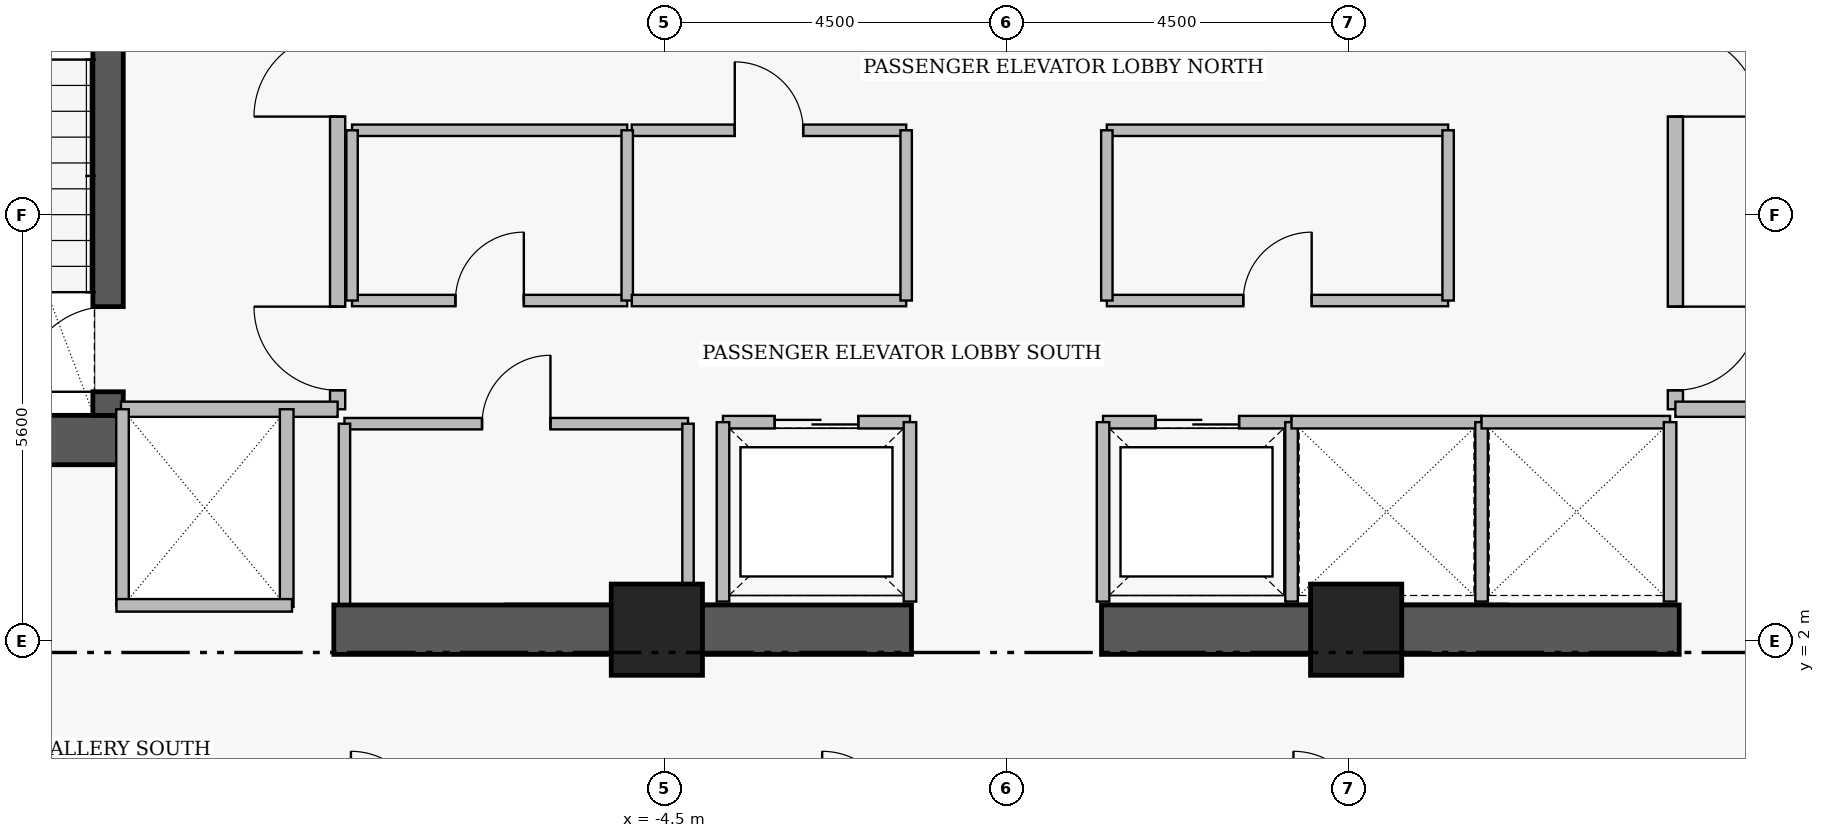
"""IFC4 building model, lengths in metres.
Left out: names, types, materials, properties, quantities, classifications, styles, units other than length and angle.
Written with IfcOpenShell. Run it as: python <this file> out.ifc"""

import sys

from ifc_helpers import new_model, si_unit, direction, frame, frame_2d, origin, origin_2d, place, context, subcontext, project, spatial, rectangle, extrude, element, fill, save


model = new_model("IFC4")
c1 = context("Model", 3, precision=1e-05, world=origin(), true_north=direction((0.0, 1.0)))
c2 = subcontext(c1, "Body", "Model", "MODEL_VIEW")
j1 = project(units=[si_unit("LENGTHUNIT", "METRE"), si_unit("PLANEANGLEUNIT", "RADIAN")], contexts=[c1])
p1 = place(None, origin())
s1 = spatial("IfcSite", under=j1, at=p1, CompositionType="ELEMENT")
p2 = place(p1, origin())
s2 = spatial("IfcBuilding", under=s1, at=p2, CompositionType="ELEMENT")
p3 = place(p2, frame((0.0, 0.0, 188.65)))
s3 = spatial("IfcBuildingStorey", under=s2, at=p3, CompositionType="ELEMENT", Elevation=188.65)
p4 = place(p3, frame((-16.06, 4.645, 0.0), z_axis=(0.0, 0.0, 1.0), x_axis=(1.0, 0.0, 0.0)))
e1 = element("IfcWall", 1, at=p4, inside=s3, PredefinedType="SHEAR", context=c2, shape_type="SweptSolid", body=[
    extrude(rectangle(XDim=4.46, YDim=0.65, at=frame_2d((2.23, 0.0))), origin(), (0.0, 0.0, 1.0), 3.56),
])
for number, where, z_axis, x_axis in (
    (2, (-8.85, 2.15, 0.0), (0.0, 0.0, 1.0), (1.0, 0.0, 0.0)),
    (3, (1.25, 2.15, 0.0), (0.0, 0.0, 1.0), (1.0, 0.0, 0.0)),
):
    element("IfcWall", number, at=place(p3, frame(where, z_axis=z_axis, x_axis=x_axis)), inside=s3, PredefinedType="SHEAR", context=c2, shape_type="SweptSolid", body=[
        extrude(rectangle(XDim=7.6, YDim=0.65, at=frame_2d((3.8, 0.0))), origin(), (0.0, 0.0, 1.0), 3.53),
    ])
p5 = place(p3, frame((-11.82, 4.97, 0.0), z_axis=(0.0, 0.0, 1.0), x_axis=(0.0, 1.0, 0.0)))
e4 = element("IfcWall", 4, at=p5, inside=s3, PredefinedType="SHEAR", context=c2, shape_type="SweptSolid", body=[
    extrude(rectangle(XDim=8.96, YDim=0.4, at=frame_2d((4.48, 0.0))), origin(), (0.0, 0.0, 1.0), 3.56),
])
p6 = place(p5, frame((0.31, 0.0, 0.0)))
e5 = element("IfcOpeningElement", 5, at=p6, cuts=e4, PredefinedType="OPENING", context=c2, shape_type="SweptSolid", body=[
    extrude(rectangle(XDim=1.12, YDim=2.22, at=frame_2d((0.56, 1.11))), frame((0.0, 0.21, 0.0), z_axis=(0.0, -1.0, 0.0), x_axis=(1.0, 0.0, 0.0)), (0.0, 0.0, 1.0), 0.42),
])
for number, where, z_axis, x_axis in (
    (6, (-4.6, 2.15, 0.0), (0.0, 0.0, 1.0), (1.0, 0.0, 0.0)),
    (7, (4.6, 2.15, 0.0), (0.0, 0.0, 1.0), (1.0, 0.0, 0.0)),
):
    element("IfcColumn", number, at=place(p3, frame(where, z_axis=z_axis, x_axis=x_axis)), inside=s3, PredefinedType="COLUMN", context=c2, shape_type="SweptSolid", body=[
        extrude(rectangle(XDim=1.2, YDim=1.2, at=origin_2d()), origin(), (0.0, 0.0, 1.0), 3.75),
    ])
p7 = place(p3, frame((-8.8, 5.05, 0.0), z_axis=(0.0, 0.0, 1.0), x_axis=(0.0, 1.0, 0.0)))
e8 = element("IfcWall", 8, at=p7, inside=s3, PredefinedType="PARTITIONING", context=c2, shape_type="SweptSolid", body=[
    extrude(rectangle(XDim=6.1, YDim=0.2, at=frame_2d((3.05, 0.0))), origin(), (0.0, 0.0, 1.0), 3.53),
])
p8 = place(p7, frame((0.25, 0.0, 0.0)))
e9 = element("IfcOpeningElement", 9, at=p8, cuts=e8, PredefinedType="OPENING", context=c2, shape_type="SweptSolid", body=[
    extrude(rectangle(XDim=1.1, YDim=2.2, at=frame_2d((0.55, 1.1))), frame((0.0, 0.11, 0.0), z_axis=(0.0, -1.0, 0.0), x_axis=(1.0, 0.0, 0.0)), (0.0, 0.0, 1.0), 0.22),
])
p9 = place(p7, frame((3.85, 0.0, 0.0)))
e10 = element("IfcOpeningElement", 10, at=p9, cuts=e8, PredefinedType="OPENING", context=c2, shape_type="SweptSolid", body=[
    extrude(rectangle(XDim=1.1, YDim=2.2, at=frame_2d((0.55, 1.1))), frame((0.0, 0.11, 0.0), z_axis=(0.0, -1.0, 0.0), x_axis=(1.0, 0.0, 0.0)), (0.0, 0.0, 1.0), 0.22),
])
p10 = place(p3, frame((8.8, 11.15, 0.0), z_axis=(0.0, 0.0, 1.0), x_axis=(0.0, -1.0, 0.0)))
e11 = element("IfcWall", 11, at=p10, inside=s3, PredefinedType="PARTITIONING", context=c2, shape_type="SweptSolid", body=[
    extrude(rectangle(XDim=6.1, YDim=0.2, at=frame_2d((3.05, 0.0))), origin(), (0.0, 0.0, 1.0), 3.53),
])
p11 = place(p10, frame((1.15, 0.0, 0.0)))
e12 = element("IfcOpeningElement", 12, at=p11, cuts=e11, PredefinedType="OPENING", context=c2, shape_type="SweptSolid", body=[
    extrude(rectangle(XDim=1.1, YDim=2.2, at=frame_2d((0.55, 1.1))), frame((0.0, 0.11, 0.0), z_axis=(0.0, -1.0, 0.0), x_axis=(1.0, 0.0, 0.0)), (0.0, 0.0, 1.0), 0.22),
])
p12 = place(p10, frame((4.75, 0.0, 0.0)))
e13 = element("IfcOpeningElement", 13, at=p12, cuts=e11, PredefinedType="OPENING", context=c2, shape_type="SweptSolid", body=[
    extrude(rectangle(XDim=1.1, YDim=2.2, at=frame_2d((0.55, 1.1))), frame((0.0, 0.11, 0.0), z_axis=(0.0, -1.0, 0.0), x_axis=(1.0, 0.0, 0.0)), (0.0, 0.0, 1.0), 0.22),
])
p13 = place(p3, frame((-3.73, 4.88, 0.0), z_axis=(0.0, 0.0, 1.0), x_axis=(1.0, 0.0, 0.0)))
e14 = element("IfcWall", 14, at=p13, inside=s3, PredefinedType="PARTITIONING", context=c2, shape_type="SweptSolid", body=[
    extrude(rectangle(XDim=2.46, YDim=0.165, at=frame_2d((1.23, 0.0))), origin(), (0.0, 0.0, 1.0), 3.53),
])
p14 = place(p13, frame((0.68, 0.0, 0.0)))
e15 = element("IfcOpeningElement", 15, at=p14, cuts=e14, PredefinedType="OPENING", context=c2, shape_type="SweptSolid", body=[
    extrude(rectangle(XDim=1.1, YDim=2.25, at=frame_2d((0.55, 1.125))), frame((0.0, 0.093, 0.0), z_axis=(0.0, -1.0, 0.0), x_axis=(1.0, 0.0, 0.0)), (0.0, 0.0, 1.0), 0.185),
])
p15 = place(p3, frame((1.27, 4.88, 0.0), z_axis=(0.0, 0.0, 1.0), x_axis=(1.0, 0.0, 0.0)))
e16 = element("IfcWall", 16, at=p15, inside=s3, PredefinedType="PARTITIONING", context=c2, shape_type="SweptSolid", body=[
    extrude(rectangle(XDim=2.48, YDim=0.165, at=frame_2d((1.24, 0.0))), origin(), (0.0, 0.0, 1.0), 3.53),
])
p16 = place(p15, frame((0.69, 0.0, 0.0)))
e17 = element("IfcOpeningElement", 17, at=p16, cuts=e16, PredefinedType="OPENING", context=c2, shape_type="SweptSolid", body=[
    extrude(rectangle(XDim=1.1, YDim=2.25, at=frame_2d((0.55, 1.125))), frame((0.0, 0.093, 0.0), z_axis=(0.0, -1.0, 0.0), x_axis=(1.0, 0.0, 0.0)), (0.0, 0.0, 1.0), 0.185),
])
p17 = place(p3, frame((-8.71, 4.86, 0.0), z_axis=(0.0, 0.0, 1.0), x_axis=(1.0, 0.0, 0.0)))
e18 = element("IfcWall", 18, at=p17, inside=s3, PredefinedType="PARTITIONING", context=c2, shape_type="SweptSolid", body=[
    extrude(rectangle(XDim=4.52, YDim=0.15, at=frame_2d((2.26, 0.0))), origin(), (0.0, 0.0, 1.0), 3.53),
])
p18 = place(p17, frame((1.81, 0.0, 0.0)))
e19 = element("IfcOpeningElement", 19, at=p18, cuts=e18, PredefinedType="OPENING", context=c2, shape_type="SweptSolid", body=[
    extrude(rectangle(XDim=0.9, YDim=2.15, at=frame_2d((0.45, 1.075))), frame((0.0, 0.085, 0.0), z_axis=(0.0, -1.0, 0.0), x_axis=(1.0, 0.0, 0.0)), (0.0, 0.0, 1.0), 0.17),
])
p19 = place(p3, frame((-8.61, 6.48, 0.0), z_axis=(0.0, 0.0, 1.0), x_axis=(1.0, 0.0, 0.0)))
e20 = element("IfcWall", 20, at=p19, inside=s3, PredefinedType="PARTITIONING", context=c2, shape_type="SweptSolid", body=[
    extrude(rectangle(XDim=3.62, YDim=0.15, at=frame_2d((1.81, 0.0))), origin(), (0.0, 0.0, 1.0), 3.53),
])
p20 = place(p19, frame((1.36, 0.0, 0.0)))
e21 = element("IfcOpeningElement", 21, at=p20, cuts=e20, PredefinedType="OPENING", context=c2, shape_type="SweptSolid", body=[
    extrude(rectangle(XDim=0.9, YDim=2.15, at=frame_2d((0.45, 1.075))), frame((0.0, 0.085, 0.0), z_axis=(0.0, -1.0, 0.0), x_axis=(1.0, 0.0, 0.0)), (0.0, 0.0, 1.0), 0.17),
])
p21 = place(p3, frame((-4.93, 8.72, 0.0), z_axis=(0.0, 0.0, 1.0), x_axis=(1.0, 0.0, 0.0)))
e22 = element("IfcWall", 22, at=p21, inside=s3, PredefinedType="PARTITIONING", context=c2, shape_type="SweptSolid", body=[
    extrude(rectangle(XDim=3.61, YDim=0.15, at=frame_2d((1.805, 0.0))), origin(), (0.0, 0.0, 1.0), 3.53),
])
p22 = place(p21, frame((1.355, 0.0, 0.0)))
e23 = element("IfcOpeningElement", 23, at=p22, cuts=e22, PredefinedType="OPENING", context=c2, shape_type="SweptSolid", body=[
    extrude(rectangle(XDim=0.9, YDim=2.15, at=frame_2d((0.45, 1.075))), frame((0.0, 0.085, 0.0), z_axis=(0.0, -1.0, 0.0), x_axis=(1.0, 0.0, 0.0)), (0.0, 0.0, 1.0), 0.17),
])
p23 = place(p3, frame((1.32, 6.48, 0.0), z_axis=(0.0, 0.0, 1.0), x_axis=(1.0, 0.0, 0.0)))
e24 = element("IfcWall", 24, at=p23, inside=s3, PredefinedType="PARTITIONING", context=c2, shape_type="SweptSolid", body=[
    extrude(rectangle(XDim=4.49, YDim=0.15, at=frame_2d((2.245, 0.0))), origin(), (0.0, 0.0, 1.0), 3.53),
])
p24 = place(p23, frame((1.795, 0.0, 0.0)))
e25 = element("IfcOpeningElement", 25, at=p24, cuts=e24, PredefinedType="OPENING", context=c2, shape_type="SweptSolid", body=[
    extrude(rectangle(XDim=0.9, YDim=2.15, at=frame_2d((0.45, 1.075))), frame((0.0, 0.085, 0.0), z_axis=(0.0, -1.0, 0.0), x_axis=(1.0, 0.0, 0.0)), (0.0, 0.0, 1.0), 0.17),
])
for number, where, z_axis, x_axis in (
    (26, (-11.65, 5.05, 0.0), (0.0, 0.0, 1.0), (1.0, 0.0, 0.0)),
    (27, (8.8, 5.05, 0.0), (0.0, 0.0, 1.0), (1.0, 0.0, 0.0)),
):
    element("IfcWall", number, at=place(p3, frame(where, z_axis=z_axis, x_axis=x_axis)), inside=s3, PredefinedType="PARTITIONING", context=c2, shape_type="SweptSolid", body=[
        extrude(rectangle(XDim=2.85, YDim=0.2, at=frame_2d((1.425, 0.0))), origin(), (0.0, 0.0, 1.0), 3.53),
    ])
for number, where, z_axis, x_axis in (
    (28, (-3.73, 2.52, 0.0), (0.0, 0.0, 1.0), (0.0, 1.0, 0.0)),
    (29, (-1.27, 2.52, 0.0), (0.0, 0.0, 1.0), (0.0, 1.0, 0.0)),
    (30, (1.27, 2.52, 0.0), (0.0, 0.0, 1.0), (0.0, 1.0, 0.0)),
    (31, (3.75, 2.52, 0.0), (0.0, 0.0, 1.0), (0.0, 1.0, 0.0)),
):
    element("IfcWall", number, at=place(p3, frame(where, z_axis=z_axis, x_axis=x_axis)), inside=s3, PredefinedType="PARTITIONING", context=c2, shape_type="SweptSolid", body=[
        extrude(rectangle(XDim=2.36, YDim=0.165, at=frame_2d((1.18, 0.0))), origin(), (0.0, 0.0, 1.0), 3.53),
    ])
p25 = place(p3, frame((3.75, 4.88, 0.0), z_axis=(0.0, 0.0, 1.0), x_axis=(1.0, 0.0, 0.0)))
e32 = element("IfcWall", 32, at=p25, inside=s3, PredefinedType="PARTITIONING", context=c2, shape_type="SweptSolid", body=[
    extrude(rectangle(XDim=2.5, YDim=0.165, at=frame_2d((1.25, 0.0))), origin(), (0.0, 0.0, 1.0), 3.53),
])
p26 = place(p3, frame((6.25, 2.52, 0.0), z_axis=(0.0, 0.0, 1.0), x_axis=(0.0, 1.0, 0.0)))
e33 = element("IfcWall", 33, at=p26, inside=s3, PredefinedType="PARTITIONING", context=c2, shape_type="SweptSolid", body=[
    extrude(rectangle(XDim=2.36, YDim=0.165, at=frame_2d((1.18, 0.0))), origin(), (0.0, 0.0, 1.0), 3.53),
])
p27 = place(p3, frame((6.25, 4.88, 0.0), z_axis=(0.0, 0.0, 1.0), x_axis=(1.0, 0.0, 0.0)))
e34 = element("IfcWall", 34, at=p27, inside=s3, PredefinedType="PARTITIONING", context=c2, shape_type="SweptSolid", body=[
    extrude(rectangle(XDim=2.48, YDim=0.165, at=frame_2d((1.24, 0.0))), origin(), (0.0, 0.0, 1.0), 3.53),
])
p28 = place(p3, frame((8.73, 2.52, 0.0), z_axis=(0.0, 0.0, 1.0), x_axis=(0.0, 1.0, 0.0)))
e35 = element("IfcWall", 35, at=p28, inside=s3, PredefinedType="PARTITIONING", context=c2, shape_type="SweptSolid", body=[
    extrude(rectangle(XDim=2.36, YDim=0.165, at=frame_2d((1.18, 0.0))), origin(), (0.0, 0.0, 1.0), 3.53),
])
for number, where, z_axis, x_axis in (
    (36, (-8.71, 2.49, 0.0), (0.0, 0.0, 1.0), (0.0, 1.0, 0.0)),
    (37, (-4.19, 2.49, 0.0), (0.0, 0.0, 1.0), (0.0, 1.0, 0.0)),
):
    element("IfcWall", number, at=place(p3, frame(where, z_axis=z_axis, x_axis=x_axis)), inside=s3, PredefinedType="PARTITIONING", context=c2, shape_type="SweptSolid", body=[
        extrude(rectangle(XDim=2.37, YDim=0.15, at=frame_2d((1.185, 0.0))), origin(), (0.0, 0.0, 1.0), 3.53),
    ])
p29 = place(p3, frame((-9.47, 2.45, 0.0), z_axis=(0.0, 0.0, 1.0), x_axis=(0.0, 1.0, 0.0)))
e38 = element("IfcWall", 38, at=p29, inside=s3, PredefinedType="PARTITIONING", context=c2, shape_type="SweptSolid", body=[
    extrude(rectangle(XDim=2.6, YDim=0.18, at=frame_2d((1.3, 0.0))), origin(), (0.0, 0.0, 1.0), 3.53),
])
p30 = place(p3, frame((-11.63, 2.47, 0.0), z_axis=(0.0, 0.0, 1.0), x_axis=(0.0, 1.0, 0.0)))
e39 = element("IfcWall", 39, at=p30, inside=s3, PredefinedType="PARTITIONING", context=c2, shape_type="SweptSolid", body=[
    extrude(rectangle(XDim=2.58, YDim=0.165, at=frame_2d((1.29, 0.0))), origin(), (0.0, 0.0, 1.0), 3.53),
])
p31 = place(p3, frame((-11.71, 2.47, 0.0), z_axis=(0.0, 0.0, 1.0), x_axis=(1.0, 0.0, 0.0)))
e40 = element("IfcWall", 40, at=p31, inside=s3, PredefinedType="PARTITIONING", context=c2, shape_type="SweptSolid", body=[
    extrude(rectangle(XDim=2.31, YDim=0.165, at=frame_2d((1.155, 0.0))), origin(), (0.0, 0.0, 1.0), 2.43),
])
p32 = place(p3, frame((-8.61, 8.72, 0.0), z_axis=(0.0, 0.0, 1.0), x_axis=(1.0, 0.0, 0.0)))
e41 = element("IfcWall", 41, at=p32, inside=s3, PredefinedType="PARTITIONING", context=c2, shape_type="SweptSolid", body=[
    extrude(rectangle(XDim=3.62, YDim=0.15, at=frame_2d((1.81, 0.0))), origin(), (0.0, 0.0, 1.0), 3.53),
])
for number, where, z_axis, x_axis in (
    (42, (-8.61, 6.48, 0.0), (0.0, 0.0, 1.0), (0.0, 1.0, 0.0)),
    (43, (-4.99, 6.48, 0.0), (0.0, 0.0, 1.0), (0.0, 1.0, 0.0)),
):
    element("IfcWall", number, at=place(p3, frame(where, z_axis=z_axis, x_axis=x_axis)), inside=s3, PredefinedType="PARTITIONING", context=c2, shape_type="SweptSolid", body=[
        extrude(rectangle(XDim=2.24, YDim=0.15, at=frame_2d((1.12, 0.0))), origin(), (0.0, 0.0, 1.0), 3.53),
    ])
p33 = place(p3, frame((-4.93, 6.48, 0.0), z_axis=(0.0, 0.0, 1.0), x_axis=(1.0, 0.0, 0.0)))
e44 = element("IfcWall", 44, at=p33, inside=s3, PredefinedType="PARTITIONING", context=c2, shape_type="SweptSolid", body=[
    extrude(rectangle(XDim=3.61, YDim=0.15, at=frame_2d((1.805, 0.0))), origin(), (0.0, 0.0, 1.0), 3.53),
])
p34 = place(p3, frame((-1.32, 6.48, 0.0), z_axis=(0.0, 0.0, 1.0), x_axis=(0.0, 1.0, 0.0)))
e45 = element("IfcWall", 45, at=p34, inside=s3, PredefinedType="PARTITIONING", context=c2, shape_type="SweptSolid", body=[
    extrude(rectangle(XDim=2.24, YDim=0.15, at=frame_2d((1.12, 0.0))), origin(), (0.0, 0.0, 1.0), 3.53),
])
p35 = place(p3, frame((1.32, 8.72, 0.0), z_axis=(0.0, 0.0, 1.0), x_axis=(1.0, 0.0, 0.0)))
e46 = element("IfcWall", 46, at=p35, inside=s3, PredefinedType="PARTITIONING", context=c2, shape_type="SweptSolid", body=[
    extrude(rectangle(XDim=4.49, YDim=0.15, at=frame_2d((2.245, 0.0))), origin(), (0.0, 0.0, 1.0), 3.53),
])
for number, where, z_axis, x_axis in (
    (47, (1.32, 6.48, 0.0), (0.0, 0.0, 1.0), (0.0, 1.0, 0.0)),
    (48, (5.81, 6.48, 0.0), (0.0, 0.0, 1.0), (0.0, 1.0, 0.0)),
):
    element("IfcWall", number, at=place(p3, frame(where, z_axis=z_axis, x_axis=x_axis)), inside=s3, PredefinedType="PARTITIONING", context=c2, shape_type="SweptSolid", body=[
        extrude(rectangle(XDim=2.24, YDim=0.15, at=frame_2d((1.12, 0.0))), origin(), (0.0, 0.0, 1.0), 3.53),
    ])
p36 = place(p6, origin())
e49 = element("IfcDoor", 49, at=p36, inside=s3, OperationType="SINGLE_SWING_LEFT", PredefinedType="DOOR", context=c2, shape_type="SweptSolid", body=[
    extrude(rectangle(XDim=1.12, YDim=2.22, at=frame_2d((0.56, 1.11))), frame((0.0, 0.025, 0.0), z_axis=(0.0, -1.0, 0.0), x_axis=(1.0, 0.0, 0.0)), (0.0, 0.0, 1.0), 0.05),
])
fill(e5, e49)
p37 = place(p8, origin())
e50 = element("IfcDoor", 50, at=p37, inside=s3, OperationType="SINGLE_SWING_RIGHT", PredefinedType="DOOR", context=c2, shape_type="SweptSolid", body=[
    extrude(rectangle(XDim=1.1, YDim=2.2, at=frame_2d((0.55, 1.1))), frame((0.0, 0.025, 0.0), z_axis=(0.0, -1.0, 0.0), x_axis=(1.0, 0.0, 0.0)), (0.0, 0.0, 1.0), 0.05),
])
fill(e9, e50)
p38 = place(p9, origin())
e51 = element("IfcDoor", 51, at=p38, inside=s3, OperationType="SINGLE_SWING_LEFT", PredefinedType="DOOR", context=c2, shape_type="SweptSolid", body=[
    extrude(rectangle(XDim=1.1, YDim=2.2, at=frame_2d((0.55, 1.1))), frame((0.0, 0.025, 0.0), z_axis=(0.0, -1.0, 0.0), x_axis=(1.0, 0.0, 0.0)), (0.0, 0.0, 1.0), 0.05),
])
fill(e10, e51)
p39 = place(p11, origin())
e52 = element("IfcDoor", 52, at=p39, inside=s3, OperationType="SINGLE_SWING_RIGHT", PredefinedType="DOOR", context=c2, shape_type="SweptSolid", body=[
    extrude(rectangle(XDim=1.1, YDim=2.2, at=frame_2d((0.55, 1.1))), frame((0.0, 0.025, 0.0), z_axis=(0.0, -1.0, 0.0), x_axis=(1.0, 0.0, 0.0)), (0.0, 0.0, 1.0), 0.05),
])
fill(e12, e52)
p40 = place(p12, origin())
e53 = element("IfcDoor", 53, at=p40, inside=s3, OperationType="SINGLE_SWING_LEFT", PredefinedType="DOOR", context=c2, shape_type="SweptSolid", body=[
    extrude(rectangle(XDim=1.1, YDim=2.2, at=frame_2d((0.55, 1.1))), frame((0.0, 0.025, 0.0), z_axis=(0.0, -1.0, 0.0), x_axis=(1.0, 0.0, 0.0)), (0.0, 0.0, 1.0), 0.05),
])
fill(e13, e53)
p41 = place(p14, origin())
e54 = element("IfcDoor", 54, at=p41, inside=s3, OperationType="SLIDING_TO_LEFT", PredefinedType="DOOR", context=c2, shape_type="SweptSolid", body=[
    extrude(rectangle(XDim=1.1, YDim=2.25, at=frame_2d((0.55, 1.125))), frame((0.0, 0.025, 0.0), z_axis=(0.0, -1.0, 0.0), x_axis=(1.0, 0.0, 0.0)), (0.0, 0.0, 1.0), 0.05),
])
fill(e15, e54)
p42 = place(p16, origin())
e55 = element("IfcDoor", 55, at=p42, inside=s3, OperationType="SLIDING_TO_LEFT", PredefinedType="DOOR", context=c2, shape_type="SweptSolid", body=[
    extrude(rectangle(XDim=1.1, YDim=2.25, at=frame_2d((0.55, 1.125))), frame((0.0, 0.025, 0.0), z_axis=(0.0, -1.0, 0.0), x_axis=(1.0, 0.0, 0.0)), (0.0, 0.0, 1.0), 0.05),
])
fill(e17, e55)
p43 = place(p18, origin())
e56 = element("IfcDoor", 56, at=p43, inside=s3, OperationType="SINGLE_SWING_RIGHT", PredefinedType="DOOR", context=c2, shape_type="SweptSolid", body=[
    extrude(rectangle(XDim=0.9, YDim=2.15, at=frame_2d((0.45, 1.075))), frame((0.0, 0.025, 0.0), z_axis=(0.0, -1.0, 0.0), x_axis=(1.0, 0.0, 0.0)), (0.0, 0.0, 1.0), 0.05),
])
fill(e19, e56)
p44 = place(p20, origin())
e57 = element("IfcDoor", 57, at=p44, inside=s3, OperationType="SINGLE_SWING_RIGHT", PredefinedType="DOOR", context=c2, shape_type="SweptSolid", body=[
    extrude(rectangle(XDim=0.9, YDim=2.15, at=frame_2d((0.45, 1.075))), frame((0.0, 0.025, 0.0), z_axis=(0.0, -1.0, 0.0), x_axis=(1.0, 0.0, 0.0)), (0.0, 0.0, 1.0), 0.05),
])
fill(e21, e57)
p45 = place(p22, origin())
e58 = element("IfcDoor", 58, at=p45, inside=s3, OperationType="SINGLE_SWING_LEFT", PredefinedType="DOOR", context=c2, shape_type="SweptSolid", body=[
    extrude(rectangle(XDim=0.9, YDim=2.15, at=frame_2d((0.45, 1.075))), frame((0.0, 0.025, 0.0), z_axis=(0.0, -1.0, 0.0), x_axis=(1.0, 0.0, 0.0)), (0.0, 0.0, 1.0), 0.05),
])
fill(e23, e58)
p46 = place(p24, origin())
e59 = element("IfcDoor", 59, at=p46, inside=s3, OperationType="SINGLE_SWING_RIGHT", PredefinedType="DOOR", context=c2, shape_type="SweptSolid", body=[
    extrude(rectangle(XDim=0.9, YDim=2.15, at=frame_2d((0.45, 1.075))), frame((0.0, 0.025, 0.0), z_axis=(0.0, -1.0, 0.0), x_axis=(1.0, 0.0, 0.0)), (0.0, 0.0, 1.0), 0.05),
])
fill(e25, e59)
save(model, sys.argv[1])
